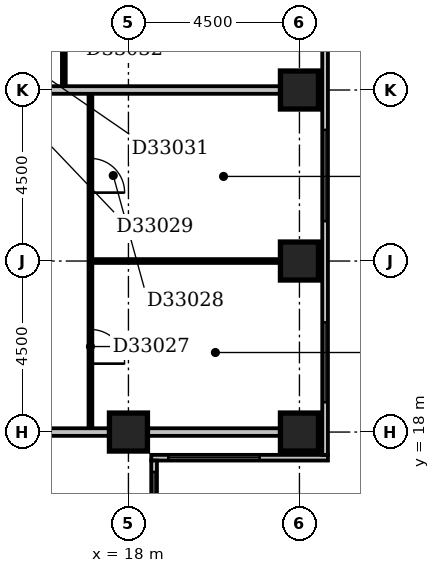
"""IFC4 building model, lengths in metres.
Left out: names, types, materials, properties, quantities, classifications, styles, units other than length and angle.
Written with IfcOpenShell. Run it as: python <this file> out.ifc"""

import sys

from ifc_helpers import new_model, si_unit, direction, frame, frame_2d, origin, origin_2d, place, context, subcontext, project, spatial, rectangle, extrude, element, fill, save


model = new_model("IFC4")
c1 = context("Model", 3, precision=1e-05, world=origin(), true_north=direction((0.0, 1.0)))
c2 = subcontext(c1, "Body", "Model", "MODEL_VIEW")
j1 = project(units=[si_unit("LENGTHUNIT", "METRE"), si_unit("PLANEANGLEUNIT", "RADIAN")], contexts=[c1])
p1 = place(None, origin())
s1 = spatial("IfcSite", under=j1, at=p1, CompositionType="ELEMENT")
p2 = place(p1, origin())
s2 = spatial("IfcBuilding", under=s1, at=p2, CompositionType="ELEMENT")
p3 = place(p2, frame((0.0, 0.0, 134.0)))
s3 = spatial("IfcBuildingStorey", under=s2, at=p3, CompositionType="ELEMENT", Elevation=134.0)
for number, where, z_axis, x_axis in (
    (1, (18.0, 18.0, -0.3), (0.0, 0.0, 1.0), (1.0, 0.0, 0.0)),
    (2, (22.5, 18.0, -0.3), (0.0, 0.0, 1.0), (1.0, 0.0, 0.0)),
    (3, (22.5, 22.5, -0.3), (0.0, 0.0, 1.0), (1.0, 0.0, 0.0)),
    (4, (22.5, 27.0, -0.3), (0.0, 0.0, 1.0), (1.0, 0.0, 0.0)),
):
    element("IfcColumn", number, at=place(p3, frame(where, z_axis=z_axis, x_axis=x_axis)), inside=s3, PredefinedType="COLUMN", context=c2, shape_type="SweptSolid", body=[
        extrude(rectangle(XDim=1.0, YDim=1.0, at=origin_2d()), origin(), (0.0, 0.0, 1.0), 3.6),
    ])
p4 = place(p3, frame((18.675, 8.4, 0.0), z_axis=(0.0, 0.0, 1.0), x_axis=(0.0, 1.0, 0.0)))
e5 = element("IfcWall", 5, at=p4, inside=s3, PredefinedType="STANDARD", context=c2, shape_type="SweptSolid", body=[
    extrude(rectangle(XDim=8.85, YDim=0.15, at=frame_2d((4.425, 0.0))), origin(), (0.0, 0.0, 1.0), 2.7),
])
p5 = place(p4, frame((1.351, 0.0, 0.6)))
e6 = element("IfcOpeningElement", 6, at=p5, cuts=e5, PredefinedType="OPENING", context=c2, shape_type="SweptSolid", body=[
    extrude(rectangle(XDim=0.45, YDim=1.8, at=frame_2d((0.225, 0.9))), frame((0.0, 0.087, 0.0), z_axis=(0.0, -1.0, 0.0), x_axis=(1.0, 0.0, 0.0)), (0.0, 0.0, 1.0), 0.174),
])
p6 = place(p4, frame((3.179, 0.0, 0.6)))
e7 = element("IfcOpeningElement", 7, at=p6, cuts=e5, PredefinedType="OPENING", context=c2, shape_type="SweptSolid", body=[
    extrude(rectangle(XDim=1.2, YDim=1.8, at=frame_2d((0.6, 0.9))), frame((0.0, 0.087, 0.0), z_axis=(0.0, -1.0, 0.0), x_axis=(1.0, 0.0, 0.0)), (0.0, 0.0, 1.0), 0.174),
])
p7 = place(p4, frame((6.15, 0.0, 0.6)))
e8 = element("IfcOpeningElement", 8, at=p7, cuts=e5, PredefinedType="OPENING", context=c2, shape_type="SweptSolid", body=[
    extrude(rectangle(XDim=2.4, YDim=1.8, at=frame_2d((1.2, 0.9))), frame((0.0, 0.087, 0.0), z_axis=(0.0, -1.0, 0.0), x_axis=(1.0, 0.0, 0.0)), (0.0, 0.0, 1.0), 0.174),
])
p8 = place(p3, frame((18.6, 17.325, 0.0), z_axis=(0.0, 0.0, 1.0), x_axis=(1.0, 0.0, 0.0)))
e9 = element("IfcWall", 9, at=p8, inside=s3, PredefinedType="STANDARD", context=c2, shape_type="SweptSolid", body=[
    extrude(rectangle(XDim=4.65, YDim=0.15, at=frame_2d((2.325, 0.0))), origin(), (0.0, 0.0, 1.0), 2.7),
])
p9 = place(p8, frame((0.45, 0.0, 0.6)))
e10 = element("IfcOpeningElement", 10, at=p9, cuts=e9, PredefinedType="OPENING", context=c2, shape_type="SweptSolid", body=[
    extrude(rectangle(XDim=2.4, YDim=1.8, at=frame_2d((1.2, 0.9))), frame((0.0, 0.087, 0.0), z_axis=(0.0, -1.0, 0.0), x_axis=(1.0, 0.0, 0.0)), (0.0, 0.0, 1.0), 0.174),
])
p10 = place(p3, frame((23.175, 17.4, 0.0), z_axis=(0.0, 0.0, 1.0), x_axis=(0.0, 1.0, 0.0)))
e11 = element("IfcWall", 11, at=p10, inside=s3, PredefinedType="STANDARD", context=c2, shape_type="SweptSolid", body=[
    extrude(rectangle(XDim=17.85, YDim=0.15, at=frame_2d((8.925, 0.0))), origin(), (0.0, 0.0, 1.0), 2.7),
])
p11 = place(p10, frame((1.385, 0.0, 0.6)))
e12 = element("IfcOpeningElement", 12, at=p11, cuts=e11, PredefinedType="OPENING", context=c2, shape_type="SweptSolid", body=[
    extrude(rectangle(XDim=2.1, YDim=1.8, at=frame_2d((1.05, 0.9))), frame((0.0, 0.087, 0.0), z_axis=(0.0, -1.0, 0.0), x_axis=(1.0, 0.0, 0.0)), (0.0, 0.0, 1.0), 0.174),
])
p12 = place(p10, frame((6.15, 0.0, 0.6)))
e13 = element("IfcOpeningElement", 13, at=p12, cuts=e11, PredefinedType="OPENING", context=c2, shape_type="SweptSolid", body=[
    extrude(rectangle(XDim=2.4, YDim=1.8, at=frame_2d((1.2, 0.9))), frame((0.0, 0.087, 0.0), z_axis=(0.0, -1.0, 0.0), x_axis=(1.0, 0.0, 0.0)), (0.0, 0.0, 1.0), 0.174),
])
p13 = place(p10, frame((10.65, 0.0, 0.6)))
e14 = element("IfcOpeningElement", 14, at=p13, cuts=e11, PredefinedType="OPENING", context=c2, shape_type="SweptSolid", body=[
    extrude(rectangle(XDim=2.4, YDim=1.8, at=frame_2d((1.2, 0.9))), frame((0.0, 0.087, 0.0), z_axis=(0.0, -1.0, 0.0), x_axis=(1.0, 0.0, 0.0)), (0.0, 0.0, 1.0), 0.174),
])
p14 = place(p10, frame((15.15, 0.0, 0.6)))
e15 = element("IfcOpeningElement", 15, at=p14, cuts=e11, PredefinedType="OPENING", context=c2, shape_type="SweptSolid", body=[
    extrude(rectangle(XDim=2.4, YDim=1.8, at=frame_2d((1.2, 0.9))), frame((0.0, 0.087, 0.0), z_axis=(0.0, -1.0, 0.0), x_axis=(1.0, 0.0, 0.0)), (0.0, 0.0, 1.0), 0.174),
])
p15 = place(p3, frame((9.1, 18.0, 0.0), z_axis=(0.0, 0.0, 1.0), x_axis=(1.0, 0.0, 0.0)))
e16 = element("IfcWall", 16, at=p15, inside=s3, PredefinedType="PARTITIONING", context=c2, shape_type="SweptSolid", body=[
    extrude(rectangle(XDim=8.4, YDim=0.2, at=frame_2d((4.2, 0.0))), origin(), (0.0, 0.0, 1.0), 2.6),
])
p16 = place(p3, frame((18.5, 18.0, 0.0), z_axis=(0.0, 0.0, 1.0), x_axis=(1.0, 0.0, 0.0)))
e17 = element("IfcWall", 17, at=p16, inside=s3, PredefinedType="PARTITIONING", context=c2, shape_type="SweptSolid", body=[
    extrude(rectangle(XDim=3.5, YDim=0.2, at=frame_2d((1.75, 0.0))), origin(), (0.0, 0.0, 1.0), 2.7),
])
p17 = place(p3, frame((17.0, 18.1, 0.0), z_axis=(0.0, 0.0, 1.0), x_axis=(0.0, 1.0, 0.0)))
e18 = element("IfcWall", 18, at=p17, inside=s3, PredefinedType="PARTITIONING", context=c2, shape_type="SweptSolid", body=[
    extrude(rectangle(XDim=8.8, YDim=0.1, at=frame_2d((4.4, 0.0))), origin(), (0.0, 0.0, 1.0), 3.3),
])
p18 = place(p17, frame((1.7, 0.0, 0.0)))
e19 = element("IfcOpeningElement", 19, at=p18, cuts=e18, PredefinedType="OPENING", context=c2, shape_type="SweptSolid", body=[
    extrude(rectangle(XDim=0.9, YDim=2.1, at=frame_2d((0.45, 1.05))), frame((0.0, 0.062, 0.0), z_axis=(0.0, -1.0, 0.0), x_axis=(1.0, 0.0, 0.0)), (0.0, 0.0, 1.0), 0.124),
])
p19 = place(p17, frame((6.2, 0.0, 0.0)))
e20 = element("IfcOpeningElement", 20, at=p19, cuts=e18, PredefinedType="OPENING", context=c2, shape_type="SweptSolid", body=[
    extrude(rectangle(XDim=0.9, YDim=2.1, at=frame_2d((0.45, 1.05))), frame((0.0, 0.062, 0.0), z_axis=(0.0, -1.0, 0.0), x_axis=(1.0, 0.0, 0.0)), (0.0, 0.0, 1.0), 0.124),
])
p20 = place(p3, frame((17.05, 22.5, 0.0), z_axis=(0.0, 0.0, 1.0), x_axis=(1.0, 0.0, 0.0)))
e21 = element("IfcWall", 21, at=p20, inside=s3, PredefinedType="PARTITIONING", context=c2, shape_type="SweptSolid", body=[
    extrude(rectangle(XDim=4.95, YDim=0.1, at=frame_2d((2.475, 0.0))), origin(), (0.0, 0.0, 1.0), 3.3),
])
p21 = place(p3, frame((9.1, 27.0, 0.0), z_axis=(0.0, 0.0, 1.0), x_axis=(1.0, 0.0, 0.0)))
e22 = element("IfcWall", 22, at=p21, inside=s3, PredefinedType="PARTITIONING", context=c2, shape_type="SweptSolid", body=[
    extrude(rectangle(XDim=12.9, YDim=0.2, at=frame_2d((6.45, 0.0))), origin(), (0.0, 0.0, 1.0), 2.7),
])
p22 = place(p3, frame((16.3, 27.1, 0.0), z_axis=(0.0, 0.0, 1.0), x_axis=(0.0, 1.0, 0.0)))
e23 = element("IfcWall", 23, at=p22, inside=s3, PredefinedType="PARTITIONING", context=c2, shape_type="SweptSolid", body=[
    extrude(rectangle(XDim=4.3, YDim=0.1, at=frame_2d((2.15, 0.0))), origin(), (0.0, 0.0, 1.0), 3.3),
])
p23 = place(p22, frame((1.7, 0.0, 0.0)))
e24 = element("IfcOpeningElement", 24, at=p23, cuts=e23, PredefinedType="OPENING", context=c2, shape_type="SweptSolid", body=[
    extrude(rectangle(XDim=0.9, YDim=2.1, at=frame_2d((0.45, 1.05))), frame((0.0, 0.062, 0.0), z_axis=(0.0, -1.0, 0.0), x_axis=(1.0, 0.0, 0.0)), (0.0, 0.0, 1.0), 0.124),
])
p24 = place(p7, origin())
e25 = element("IfcWindow", 25, at=p24, inside=s3, PartitioningType="SINGLE_PANEL", PredefinedType="WINDOW", context=c2, shape_type="SweptSolid", body=[
    extrude(rectangle(XDim=2.4, YDim=1.8, at=frame_2d((1.2, 0.9))), frame((0.0, 0.03, 0.0), z_axis=(0.0, -1.0, 0.0), x_axis=(1.0, 0.0, 0.0)), (0.0, 0.0, 1.0), 0.06),
])
fill(e8, e25)
p25 = place(p9, origin())
e26 = element("IfcWindow", 26, at=p25, inside=s3, PartitioningType="SINGLE_PANEL", PredefinedType="WINDOW", context=c2, shape_type="SweptSolid", body=[
    extrude(rectangle(XDim=2.4, YDim=1.8, at=frame_2d((1.2, 0.9))), frame((0.0, 0.03, 0.0), z_axis=(0.0, -1.0, 0.0), x_axis=(1.0, 0.0, 0.0)), (0.0, 0.0, 1.0), 0.06),
])
fill(e10, e26)
p26 = place(p11, origin())
e27 = element("IfcWindow", 27, at=p26, inside=s3, PartitioningType="SINGLE_PANEL", PredefinedType="WINDOW", context=c2, shape_type="SweptSolid", body=[
    extrude(rectangle(XDim=2.1, YDim=1.8, at=frame_2d((1.05, 0.9))), frame((0.0, 0.03, 0.0), z_axis=(0.0, -1.0, 0.0), x_axis=(1.0, 0.0, 0.0)), (0.0, 0.0, 1.0), 0.06),
])
fill(e12, e27)
p27 = place(p12, origin())
e28 = element("IfcWindow", 28, at=p27, inside=s3, PartitioningType="SINGLE_PANEL", PredefinedType="WINDOW", context=c2, shape_type="SweptSolid", body=[
    extrude(rectangle(XDim=2.4, YDim=1.8, at=frame_2d((1.2, 0.9))), frame((0.0, 0.03, 0.0), z_axis=(0.0, -1.0, 0.0), x_axis=(1.0, 0.0, 0.0)), (0.0, 0.0, 1.0), 0.06),
])
fill(e13, e28)
p28 = place(p18, frame((0.9, 0.0, 0.0), z_axis=(0.0, 0.0, 1.0), x_axis=(-1.0, 0.0, 0.0)))
e29 = element("IfcDoor", 29, at=p28, inside=s3, OperationType="SINGLE_SWING_RIGHT", PredefinedType="DOOR", context=c2, shape_type="SweptSolid", body=[
    extrude(rectangle(XDim=0.9, YDim=2.1, at=frame_2d((0.45, 1.05))), frame((0.0, 0.025, 0.0), z_axis=(0.0, -1.0, 0.0), x_axis=(1.0, 0.0, 0.0)), (0.0, 0.0, 1.0), 0.05),
])
fill(e19, e29)
p29 = place(p19, frame((0.9, 0.0, 0.0), z_axis=(0.0, 0.0, 1.0), x_axis=(-1.0, 0.0, 0.0)))
e30 = element("IfcDoor", 30, at=p29, inside=s3, OperationType="SINGLE_SWING_RIGHT", PredefinedType="DOOR", context=c2, shape_type="SweptSolid", body=[
    extrude(rectangle(XDim=0.9, YDim=2.1, at=frame_2d((0.45, 1.05))), frame((0.0, 0.025, 0.0), z_axis=(0.0, -1.0, 0.0), x_axis=(1.0, 0.0, 0.0)), (0.0, 0.0, 1.0), 0.05),
])
fill(e20, e30)
save(model, sys.argv[1])
